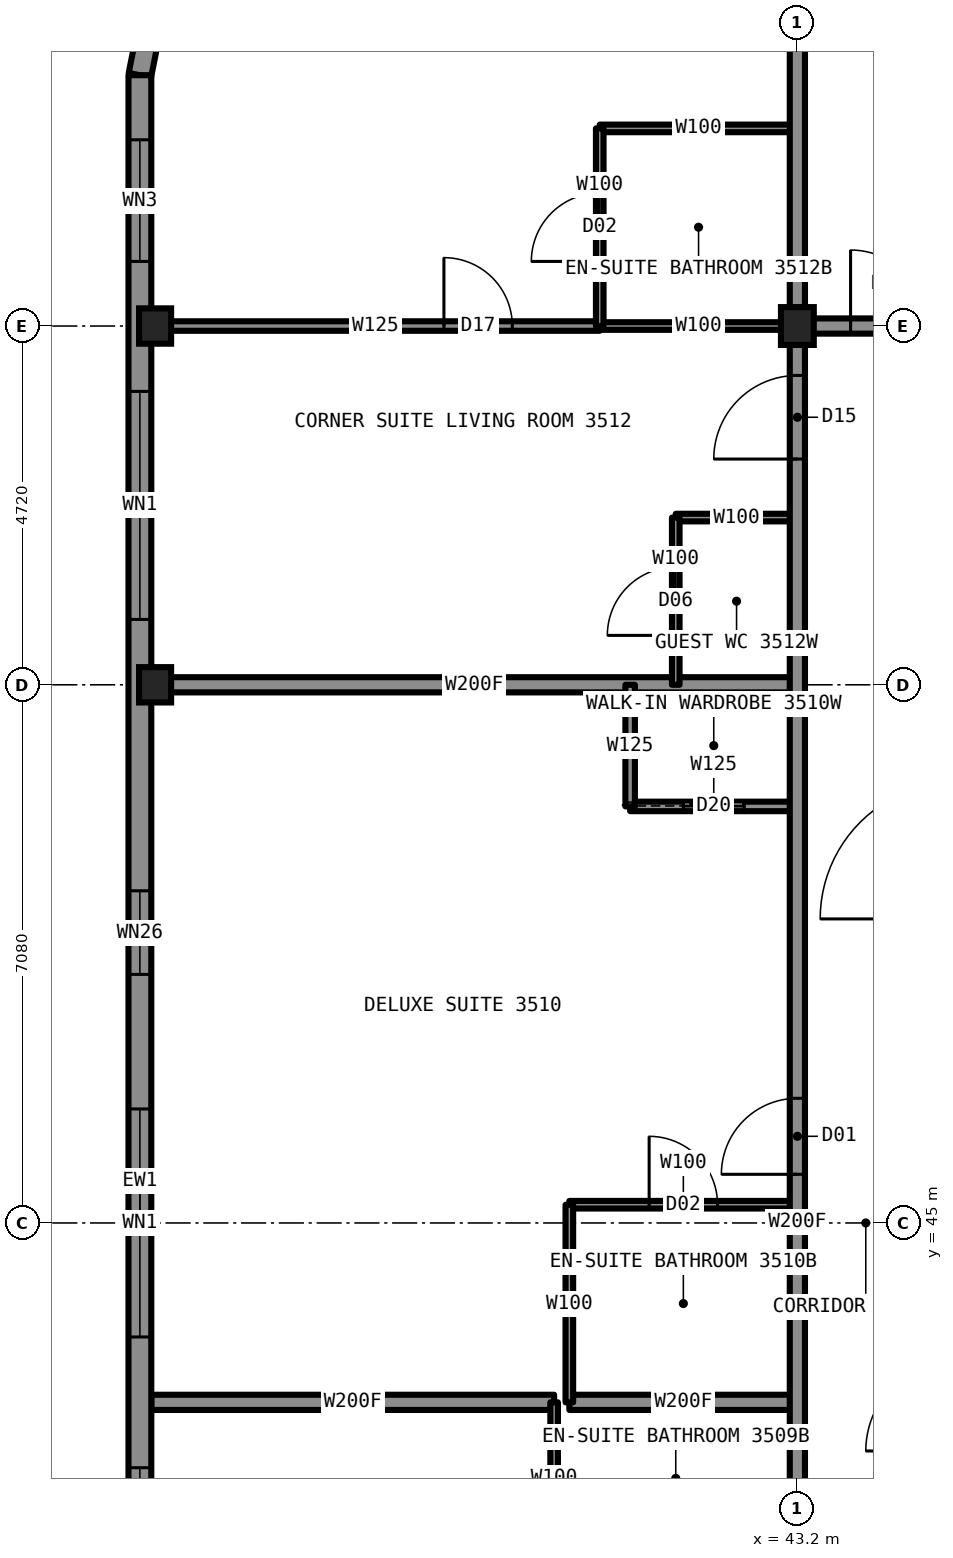
"""IFC4 building model, lengths in metres.
Left out: names, types, materials, properties, quantities, classifications, styles, units other than length and angle.
Written with IfcOpenShell. Run it as: python <this file> out.ifc"""

import sys

from ifc_helpers import new_model, si_unit, direction, frame, frame_2d, origin, origin_2d, place, context, subcontext, project, spatial, rectangle, i_section, extrude, element, fill, save


model = new_model("IFC4")
c1 = context("Model", 3, precision=1e-05, world=origin(), true_north=direction((0.0, 1.0)))
c2 = subcontext(c1, "Body", "Model", "MODEL_VIEW")
j1 = project(units=[si_unit("LENGTHUNIT", "METRE"), si_unit("PLANEANGLEUNIT", "RADIAN")], contexts=[c1])
p1 = place(None, origin())
s1 = spatial("IfcSite", under=j1, at=p1, CompositionType="ELEMENT")
p2 = place(p1, origin())
s2 = spatial("IfcBuilding", under=s1, at=p2, CompositionType="ELEMENT")
p3 = place(p2, frame((0.0, 0.0, 124.9)))
s3 = spatial("IfcBuildingStorey", under=s2, at=p3, CompositionType="ELEMENT", Elevation=124.9)
for number, where, z_axis, x_axis in (
    (1, (34.75, 52.08, 0.0), (0.0, 0.0, 1.0), (1.0, 0.0, 0.0)),
    (2, (34.75, 56.8, 0.0), (0.0, 0.0, 1.0), (1.0, 0.0, 0.0)),
):
    element("IfcColumn", number, at=place(p3, frame(where, z_axis=z_axis, x_axis=x_axis)), inside=s3, PredefinedType="COLUMN", context=c2, shape_type="SweptSolid", body=[
        extrude(i_section(OverallWidth=0.422, OverallDepth=0.465, WebThickness=0.045, FlangeThickness=0.073, at=origin_2d()), origin(), (0.0, 0.0, 1.0), 3.5),
    ])
p4 = place(p3, frame((43.2, 56.8, 0.0), z_axis=(0.0, 0.0, 1.0), x_axis=(1.0, 0.0, 0.0)))
e3 = element("IfcColumn", 3, at=p4, inside=s3, PredefinedType="COLUMN", context=c2, shape_type="SweptSolid", body=[
    extrude(i_section(OverallWidth=0.432, OverallDepth=0.498, WebThickness=0.056, FlangeThickness=0.089, at=origin_2d()), origin(), (0.0, 0.0, 1.0), 3.5),
])
p5 = place(p3, frame((34.7, 42.64, 0.0), z_axis=(0.0, 0.0, 1.0), x_axis=(1.0, 0.0, 0.0)))
e4 = element("IfcWall", 4, at=p5, inside=s3, PredefinedType="PARTITIONING", context=c2, shape_type="SweptSolid", body=[
    extrude(rectangle(XDim=5.3, YDim=0.2, at=frame_2d((2.65, 0.0))), origin(), (0.0, 0.0, 1.0), 2.731),
])
p6 = place(p3, frame((40.2, 42.64, 0.0), z_axis=(0.0, 0.0, 1.0), x_axis=(1.0, 0.0, 0.0)))
e5 = element("IfcWall", 5, at=p6, inside=s3, PredefinedType="PARTITIONING", context=c2, shape_type="SweptSolid", body=[
    extrude(rectangle(XDim=3.0, YDim=0.2, at=frame_2d((1.5, 0.0))), origin(), (0.0, 0.0, 1.0), 2.731),
])
p7 = place(p3, frame((40.2, 45.24, 0.0), z_axis=(0.0, 0.0, 1.0), x_axis=(1.0, 0.0, 0.0)))
e6 = element("IfcWall", 6, at=p7, inside=s3, PredefinedType="PARTITIONING", context=c2, shape_type="SweptSolid", body=[
    extrude(rectangle(XDim=3.0, YDim=0.1, at=frame_2d((1.5, 0.0))), origin(), (0.0, 0.0, 1.0), 3.33),
])
p8 = place(p7, frame((1.05, 0.0, 0.0)))
e7 = element("IfcOpeningElement", 7, at=p8, cuts=e6, PredefinedType="OPENING", context=c2, shape_type="SweptSolid", body=[
    extrude(rectangle(XDim=0.9, YDim=2.1, at=frame_2d((0.45, 1.05))), frame((0.0, 0.06, 0.0), z_axis=(0.0, -1.0, 0.0), x_axis=(1.0, 0.0, 0.0)), (0.0, 0.0, 1.0), 0.12),
])
p9 = place(p3, frame((40.6, 56.8, 0.0), z_axis=(0.0, 0.0, 1.0), x_axis=(1.0, 0.0, 0.0)))
e8 = element("IfcWall", 8, at=p9, inside=s3, PredefinedType="PARTITIONING", context=c2, shape_type="SweptSolid", body=[
    extrude(rectangle(XDim=2.6, YDim=0.1, at=frame_2d((1.3, 0.0))), origin(), (0.0, 0.0, 1.0), 2.573),
])
p10 = place(p3, frame((43.2, 56.8, 0.0), z_axis=(0.0, 0.0, 1.0), x_axis=(1.0, 0.0, 0.0)))
e9 = element("IfcWall", 9, at=p10, inside=s3, PredefinedType="PARTITIONING", context=c2, shape_type="SweptSolid", body=[
    extrude(rectangle(XDim=23.6, YDim=0.2, at=frame_2d((11.8, 0.0))), origin(), (0.0, 0.0, 1.0), 3.33),
])
p11 = place(p10, frame((0.7, 0.0, 0.0)))
e10 = element("IfcOpeningElement", 10, at=p11, cuts=e9, PredefinedType="OPENING", context=c2, shape_type="SweptSolid", body=[
    extrude(rectangle(XDim=1.0, YDim=2.2, at=frame_2d((0.5, 1.1))), frame((0.0, 0.11, 0.0), z_axis=(0.0, -1.0, 0.0), x_axis=(1.0, 0.0, 0.0)), (0.0, 0.0, 1.0), 0.22),
])
p12 = place(p10, frame((5.12, 0.0, 0.0)))
e11 = element("IfcOpeningElement", 11, at=p12, cuts=e9, PredefinedType="OPENING", context=c2, shape_type="SweptSolid", body=[
    extrude(rectangle(XDim=1.0, YDim=2.2, at=frame_2d((0.5, 1.1))), frame((0.0, 0.11, 0.0), z_axis=(0.0, -1.0, 0.0), x_axis=(1.0, 0.0, 0.0)), (0.0, 0.0, 1.0), 0.22),
])
p13 = place(p10, frame((12.44, 0.0, 0.0)))
e12 = element("IfcOpeningElement", 12, at=p13, cuts=e9, PredefinedType="OPENING", context=c2, shape_type="SweptSolid", body=[
    extrude(rectangle(XDim=1.0, YDim=2.2, at=frame_2d((0.5, 1.1))), frame((0.0, 0.11, 0.0), z_axis=(0.0, -1.0, 0.0), x_axis=(1.0, 0.0, 0.0)), (0.0, 0.0, 1.0), 0.22),
])
p14 = place(p10, frame((21.14, 0.0, 0.0)))
e13 = element("IfcOpeningElement", 13, at=p14, cuts=e9, PredefinedType="OPENING", context=c2, shape_type="SweptSolid", body=[
    extrude(rectangle(XDim=1.0, YDim=2.2, at=frame_2d((0.5, 1.1))), frame((0.0, 0.11, 0.0), z_axis=(0.0, -1.0, 0.0), x_axis=(1.0, 0.0, 0.0)), (0.0, 0.0, 1.0), 0.22),
])
p15 = place(p3, frame((34.7, 56.8, 0.0), z_axis=(0.0, 0.0, 1.0), x_axis=(1.0, 0.0, 0.0)))
e14 = element("IfcWall", 14, at=p15, inside=s3, PredefinedType="PARTITIONING", context=c2, shape_type="SweptSolid", body=[
    extrude(rectangle(XDim=5.9, YDim=0.125, at=frame_2d((2.95, 0.0))), origin(), (0.0, 0.0, 1.0), 2.573),
])
p16 = place(p15, frame((3.85, 0.0, 0.0)))
e15 = element("IfcOpeningElement", 15, at=p16, cuts=e14, PredefinedType="OPENING", context=c2, shape_type="SweptSolid", body=[
    extrude(rectangle(XDim=0.9, YDim=2.2, at=frame_2d((0.45, 1.1))), frame((0.0, 0.073, 0.0), z_axis=(0.0, -1.0, 0.0), x_axis=(1.0, 0.0, 0.0)), (0.0, 0.0, 1.0), 0.145),
])
p17 = place(p3, frame((40.6, 59.4, 0.0), z_axis=(0.0, 0.0, 1.0), x_axis=(1.0, 0.0, 0.0)))
e16 = element("IfcWall", 16, at=p17, inside=s3, PredefinedType="PARTITIONING", context=c2, shape_type="SweptSolid", body=[
    extrude(rectangle(XDim=2.6, YDim=0.1, at=frame_2d((1.3, 0.0))), origin(), (0.0, 0.0, 1.0), 3.33),
])
p18 = place(p3, frame((41.0, 50.48, 0.0), z_axis=(0.0, 0.0, 1.0), x_axis=(1.0, 0.0, 0.0)))
e17 = element("IfcWall", 17, at=p18, inside=s3, PredefinedType="PARTITIONING", context=c2, shape_type="SweptSolid", body=[
    extrude(rectangle(XDim=2.2, YDim=0.125, at=frame_2d((1.1, 0.0))), origin(), (0.0, 0.0, 1.0), 3.33),
])
p19 = place(p18, frame((0.7, 0.0, 0.0)))
e18 = element("IfcOpeningElement", 18, at=p19, cuts=e17, PredefinedType="OPENING", context=c2, shape_type="SweptSolid", body=[
    extrude(rectangle(XDim=0.8, YDim=2.1, at=frame_2d((0.4, 1.05))), frame((0.0, 0.073, 0.0), z_axis=(0.0, -1.0, 0.0), x_axis=(1.0, 0.0, 0.0)), (0.0, 0.0, 1.0), 0.145),
])
p20 = place(p3, frame((34.7, 52.08, 0.0), z_axis=(0.0, 0.0, 1.0), x_axis=(1.0, 0.0, 0.0)))
e19 = element("IfcWall", 19, at=p20, inside=s3, PredefinedType="PARTITIONING", context=c2, shape_type="SweptSolid", body=[
    extrude(rectangle(XDim=8.5, YDim=0.2, at=frame_2d((4.25, 0.0))), origin(), (0.0, 0.0, 1.0), 2.573),
])
p21 = place(p3, frame((41.6, 54.28, 0.0), z_axis=(0.0, 0.0, 1.0), x_axis=(1.0, 0.0, 0.0)))
e20 = element("IfcWall", 20, at=p21, inside=s3, PredefinedType="PARTITIONING", context=c2, shape_type="SweptSolid", body=[
    extrude(rectangle(XDim=1.6, YDim=0.1, at=frame_2d((0.8, 0.0))), origin(), (0.0, 0.0, 1.0), 3.33),
])
p22 = place(p3, frame((43.2, 33.22, 0.0), z_axis=(0.0, 0.0, 1.0), x_axis=(0.0, 1.0, 0.0)))
e21 = element("IfcWall", 21, at=p22, inside=s3, PredefinedType="PARTITIONING", context=c2, shape_type="SweptSolid", body=[
    extrude(rectangle(XDim=23.58, YDim=0.2, at=frame_2d((11.79, 0.0))), origin(), (0.0, 0.0, 1.0), 3.33),
])
p23 = place(p22, frame((6.16, 0.0, 0.0)))
e22 = element("IfcOpeningElement", 22, at=p23, cuts=e21, PredefinedType="OPENING", context=c2, shape_type="SweptSolid", body=[
    extrude(rectangle(XDim=1.0, YDim=2.2, at=frame_2d((0.5, 1.1))), frame((0.0, 0.11, 0.0), z_axis=(0.0, -1.0, 0.0), x_axis=(1.0, 0.0, 0.0)), (0.0, 0.0, 1.0), 0.22),
])
p24 = place(p22, frame((12.42, 0.0, 0.0)))
e23 = element("IfcOpeningElement", 23, at=p24, cuts=e21, PredefinedType="OPENING", context=c2, shape_type="SweptSolid", body=[
    extrude(rectangle(XDim=1.0, YDim=2.2, at=frame_2d((0.5, 1.1))), frame((0.0, 0.11, 0.0), z_axis=(0.0, -1.0, 0.0), x_axis=(1.0, 0.0, 0.0)), (0.0, 0.0, 1.0), 0.22),
])
p25 = place(p22, frame((21.83, 0.0, 0.0)))
e24 = element("IfcOpeningElement", 24, at=p25, cuts=e21, PredefinedType="OPENING", context=c2, shape_type="SweptSolid", body=[
    extrude(rectangle(XDim=1.1, YDim=2.2, at=frame_2d((0.55, 1.1))), frame((0.0, 0.11, 0.0), z_axis=(0.0, -1.0, 0.0), x_axis=(1.0, 0.0, 0.0)), (0.0, 0.0, 1.0), 0.22),
])
p26 = place(p22, frame((0.63, 0.0, 0.0)))
e25 = element("IfcOpeningElement", 25, at=p26, cuts=e21, PredefinedType="OPENING", context=c2, shape_type="SweptSolid", body=[
    extrude(rectangle(XDim=1.1, YDim=2.2, at=frame_2d((0.55, 1.1))), frame((0.0, 0.11, 0.0), z_axis=(0.0, -1.0, 0.0), x_axis=(1.0, 0.0, 0.0)), (0.0, 0.0, 1.0), 0.22),
])
p27 = place(p3, frame((43.2, 56.8, 0.0), z_axis=(0.0, 0.0, 1.0), x_axis=(0.0, 1.0, 0.0)))
e26 = element("IfcWall", 26, at=p27, inside=s3, PredefinedType="PARTITIONING", context=c2, shape_type="SweptSolid", body=[
    extrude(rectangle(XDim=8.5, YDim=0.2, at=frame_2d((4.25, 0.0))), origin(), (0.0, 0.0, 1.0), 2.573),
])
p28 = place(p3, frame((41.6, 52.08, 0.0), z_axis=(0.0, 0.0, 1.0), x_axis=(0.0, 1.0, 0.0)))
e27 = element("IfcWall", 27, at=p28, inside=s3, PredefinedType="PARTITIONING", context=c2, shape_type="SweptSolid", body=[
    extrude(rectangle(XDim=2.2, YDim=0.1, at=frame_2d((1.1, 0.0))), origin(), (0.0, 0.0, 1.0), 3.33),
])
p29 = place(p28, frame((0.65, 0.0, 0.0)))
e28 = element("IfcOpeningElement", 28, at=p29, cuts=e27, PredefinedType="OPENING", context=c2, shape_type="SweptSolid", body=[
    extrude(rectangle(XDim=0.9, YDim=2.1, at=frame_2d((0.45, 1.05))), frame((0.0, 0.06, 0.0), z_axis=(0.0, -1.0, 0.0), x_axis=(1.0, 0.0, 0.0)), (0.0, 0.0, 1.0), 0.12),
])
p30 = place(p3, frame((41.0, 50.48, 0.0), z_axis=(0.0, 0.0, 1.0), x_axis=(0.0, 1.0, 0.0)))
e29 = element("IfcWall", 29, at=p30, inside=s3, PredefinedType="PARTITIONING", context=c2, shape_type="SweptSolid", body=[
    extrude(rectangle(XDim=1.6, YDim=0.125, at=frame_2d((0.8, 0.0))), origin(), (0.0, 0.0, 1.0), 3.33),
])
p31 = place(p3, frame((40.6, 56.8, 0.0), z_axis=(0.0, 0.0, 1.0), x_axis=(0.0, 1.0, 0.0)))
e30 = element("IfcWall", 30, at=p31, inside=s3, PredefinedType="PARTITIONING", context=c2, shape_type="SweptSolid", body=[
    extrude(rectangle(XDim=2.6, YDim=0.1, at=frame_2d((1.3, 0.0))), origin(), (0.0, 0.0, 1.0), 3.33),
])
p32 = place(p31, frame((0.85, 0.0, 0.0)))
e31 = element("IfcOpeningElement", 31, at=p32, cuts=e30, PredefinedType="OPENING", context=c2, shape_type="SweptSolid", body=[
    extrude(rectangle(XDim=0.9, YDim=2.1, at=frame_2d((0.45, 1.05))), frame((0.0, 0.06, 0.0), z_axis=(0.0, -1.0, 0.0), x_axis=(1.0, 0.0, 0.0)), (0.0, 0.0, 1.0), 0.12),
])
p33 = place(p3, frame((40.2, 42.64, 0.0), z_axis=(0.0, 0.0, 1.0), x_axis=(0.0, 1.0, 0.0)))
e32 = element("IfcWall", 32, at=p33, inside=s3, PredefinedType="PARTITIONING", context=c2, shape_type="SweptSolid", body=[
    extrude(rectangle(XDim=2.6, YDim=0.1, at=frame_2d((1.3, 0.0))), origin(), (0.0, 0.0, 1.0), 3.33),
])
p34 = place(p3, frame((40.0, 40.64, 0.0), z_axis=(0.0, 0.0, 1.0), x_axis=(0.0, 1.0, 0.0)))
e33 = element("IfcWall", 33, at=p34, inside=s3, PredefinedType="PARTITIONING", context=c2, shape_type="SweptSolid", body=[
    extrude(rectangle(XDim=2.0, YDim=0.1, at=frame_2d((1.0, 0.0))), origin(), (0.0, 0.0, 1.0), 3.33),
])
p35 = place(p3, frame((34.957, 62.147, 0.0), z_axis=(0.0, 0.0, 1.0), x_axis=(-0.195081421501, -0.980787050784, 0.0)))
e34 = element("IfcWall", 34, at=p35, inside=s3, PredefinedType="SOLIDWALL", context=c2, shape_type="SweptSolid", body=[
    extrude(rectangle(XDim=2.087, YDim=0.3, at=frame_2d((1.044, 0.0))), origin(), (0.0, 0.0, 1.0), 3.33),
])
p36 = place(p35, frame((0.444, 0.0, 0.5)))
e35 = element("IfcOpeningElement", 35, at=p36, cuts=e34, PredefinedType="OPENING", context=c2, shape_type="SweptSolid", body=[
    extrude(rectangle(XDim=1.2, YDim=2.0, at=frame_2d((0.6, 1.0))), frame((0.0, 0.16, 0.0), z_axis=(0.0, -1.0, 0.0), x_axis=(1.0, 0.0, 0.0)), (0.0, 0.0, 1.0), 0.32),
])
p37 = place(p3, frame((34.55, 60.1, 0.0), z_axis=(0.0, 0.0, 1.0), x_axis=(0.0, -1.0, 0.0)))
e36 = element("IfcWall", 36, at=p37, inside=s3, PredefinedType="SOLIDWALL", context=c2, shape_type="SweptSolid", body=[
    extrude(rectangle(XDim=30.2, YDim=0.3, at=frame_2d((15.1, 0.0))), origin(), (0.0, 0.0, 1.0), 2.83),
])
p38 = place(p37, frame((0.85, 0.0, 0.5)))
e37 = element("IfcOpeningElement", 37, at=p38, cuts=e36, PredefinedType="OPENING", context=c2, shape_type="SweptSolid", body=[
    extrude(rectangle(XDim=1.6, YDim=2.0, at=frame_2d((0.8, 1.0))), frame((0.0, 0.16, 0.0), z_axis=(0.0, -1.0, 0.0), x_axis=(1.0, 0.0, 0.0)), (0.0, 0.0, 1.0), 0.32),
])
p39 = place(p37, frame((4.16, 0.0, 0.5)))
e38 = element("IfcOpeningElement", 38, at=p39, cuts=e36, PredefinedType="OPENING", context=c2, shape_type="SweptSolid", body=[
    extrude(rectangle(XDim=3.0, YDim=2.0, at=frame_2d((1.5, 1.0))), frame((0.0, 0.16, 0.0), z_axis=(0.0, -1.0, 0.0), x_axis=(1.0, 0.0, 0.0)), (0.0, 0.0, 1.0), 0.32),
])
p40 = place(p37, frame((8.88, 0.0, 0.5)))
e39 = element("IfcOpeningElement", 39, at=p40, cuts=e36, PredefinedType="OPENING", context=c2, shape_type="SweptSolid", body=[
    extrude(rectangle(XDim=3.0, YDim=2.0, at=frame_2d((1.5, 1.0))), frame((0.0, 0.16, 0.0), z_axis=(0.0, -1.0, 0.0), x_axis=(1.0, 0.0, 0.0)), (0.0, 0.0, 1.0), 0.32),
])
p41 = place(p37, frame((18.32, 0.0, 0.5)))
e40 = element("IfcOpeningElement", 40, at=p41, cuts=e36, PredefinedType="OPENING", context=c2, shape_type="SweptSolid", body=[
    extrude(rectangle(XDim=3.0, YDim=2.0, at=frame_2d((1.5, 1.0))), frame((0.0, 0.16, 0.0), z_axis=(0.0, -1.0, 0.0), x_axis=(1.0, 0.0, 0.0)), (0.0, 0.0, 1.0), 0.32),
])
p42 = place(p37, frame((23.04, 0.0, 0.5)))
e41 = element("IfcOpeningElement", 41, at=p42, cuts=e36, PredefinedType="OPENING", context=c2, shape_type="SweptSolid", body=[
    extrude(rectangle(XDim=3.0, YDim=2.0, at=frame_2d((1.5, 1.0))), frame((0.0, 0.16, 0.0), z_axis=(0.0, -1.0, 0.0), x_axis=(1.0, 0.0, 0.0)), (0.0, 0.0, 1.0), 0.32),
])
p43 = place(p37, frame((27.75, 0.0, 0.5)))
e42 = element("IfcOpeningElement", 42, at=p43, cuts=e36, PredefinedType="OPENING", context=c2, shape_type="SweptSolid", body=[
    extrude(rectangle(XDim=1.6, YDim=2.0, at=frame_2d((0.8, 1.0))), frame((0.0, 0.16, 0.0), z_axis=(0.0, -1.0, 0.0), x_axis=(1.0, 0.0, 0.0)), (0.0, 0.0, 1.0), 0.32),
])
p44 = place(p11, origin())
e43 = element("IfcDoor", 43, at=p44, inside=s3, OperationType="SINGLE_SWING_LEFT", PredefinedType="DOOR", context=c2, shape_type="SweptSolid", body=[
    extrude(rectangle(XDim=1.0, YDim=2.2, at=frame_2d((0.5, 1.1))), frame((0.0, 0.025, 0.0), z_axis=(0.0, -1.0, 0.0), x_axis=(1.0, 0.0, 0.0)), (0.0, 0.0, 1.0), 0.05),
])
fill(e10, e43)
p45 = place(p24, origin())
e44 = element("IfcDoor", 44, at=p45, inside=s3, OperationType="SINGLE_SWING_LEFT", PredefinedType="DOOR", context=c2, shape_type="SweptSolid", body=[
    extrude(rectangle(XDim=1.0, YDim=2.2, at=frame_2d((0.5, 1.1))), frame((0.0, 0.025, 0.0), z_axis=(0.0, -1.0, 0.0), x_axis=(1.0, 0.0, 0.0)), (0.0, 0.0, 1.0), 0.05),
])
fill(e23, e44)
p46 = place(p8, origin())
e45 = element("IfcDoor", 45, at=p46, inside=s3, OperationType="SINGLE_SWING_RIGHT", PredefinedType="DOOR", context=c2, shape_type="SweptSolid", body=[
    extrude(rectangle(XDim=0.9, YDim=2.1, at=frame_2d((0.45, 1.05))), frame((0.0, 0.025, 0.0), z_axis=(0.0, -1.0, 0.0), x_axis=(1.0, 0.0, 0.0)), (0.0, 0.0, 1.0), 0.05),
])
fill(e7, e45)
p47 = place(p19, origin())
e46 = element("IfcDoor", 46, at=p47, inside=s3, OperationType="SLIDING_TO_LEFT", PredefinedType="DOOR", context=c2, shape_type="SweptSolid", body=[
    extrude(rectangle(XDim=0.8, YDim=2.1, at=frame_2d((0.4, 1.05))), frame((0.0, 0.025, 0.0), z_axis=(0.0, -1.0, 0.0), x_axis=(1.0, 0.0, 0.0)), (0.0, 0.0, 1.0), 0.05),
])
fill(e18, e46)
p48 = place(p25, origin())
e47 = element("IfcDoor", 47, at=p48, inside=s3, OperationType="SINGLE_SWING_LEFT", PredefinedType="DOOR", context=c2, shape_type="SweptSolid", body=[
    extrude(rectangle(XDim=1.1, YDim=2.2, at=frame_2d((0.55, 1.1))), frame((0.0, 0.025, 0.0), z_axis=(0.0, -1.0, 0.0), x_axis=(1.0, 0.0, 0.0)), (0.0, 0.0, 1.0), 0.05),
])
fill(e24, e47)
p49 = place(p32, origin())
e48 = element("IfcDoor", 48, at=p49, inside=s3, OperationType="SINGLE_SWING_RIGHT", PredefinedType="DOOR", context=c2, shape_type="SweptSolid", body=[
    extrude(rectangle(XDim=0.9, YDim=2.1, at=frame_2d((0.45, 1.05))), frame((0.0, 0.025, 0.0), z_axis=(0.0, -1.0, 0.0), x_axis=(1.0, 0.0, 0.0)), (0.0, 0.0, 1.0), 0.05),
])
fill(e31, e48)
p50 = place(p16, origin())
e49 = element("IfcDoor", 49, at=p50, inside=s3, OperationType="SINGLE_SWING_LEFT", PredefinedType="DOOR", context=c2, shape_type="SweptSolid", body=[
    extrude(rectangle(XDim=0.9, YDim=2.2, at=frame_2d((0.45, 1.1))), frame((0.0, 0.025, 0.0), z_axis=(0.0, -1.0, 0.0), x_axis=(1.0, 0.0, 0.0)), (0.0, 0.0, 1.0), 0.05),
])
fill(e15, e49)
p51 = place(p29, origin())
e50 = element("IfcDoor", 50, at=p51, inside=s3, OperationType="SINGLE_SWING_LEFT", PredefinedType="DOOR", context=c2, shape_type="SweptSolid", body=[
    extrude(rectangle(XDim=0.9, YDim=2.1, at=frame_2d((0.45, 1.05))), frame((0.0, 0.025, 0.0), z_axis=(0.0, -1.0, 0.0), x_axis=(1.0, 0.0, 0.0)), (0.0, 0.0, 1.0), 0.05),
])
fill(e28, e50)
p52 = place(p38, origin())
e51 = element("IfcWindow", 51, at=p52, inside=s3, PartitioningType="SINGLE_PANEL", PredefinedType="WINDOW", context=c2, shape_type="SweptSolid", body=[
    extrude(rectangle(XDim=1.6, YDim=2.0, at=frame_2d((0.8, 1.0))), frame((0.0, 0.03, 0.0), z_axis=(0.0, -1.0, 0.0), x_axis=(1.0, 0.0, 0.0)), (0.0, 0.0, 1.0), 0.06),
])
fill(e37, e51)
p53 = place(p39, origin())
e52 = element("IfcWindow", 52, at=p53, inside=s3, PartitioningType="SINGLE_PANEL", PredefinedType="WINDOW", context=c2, shape_type="SweptSolid", body=[
    extrude(rectangle(XDim=3.0, YDim=2.0, at=frame_2d((1.5, 1.0))), frame((0.0, 0.03, 0.0), z_axis=(0.0, -1.0, 0.0), x_axis=(1.0, 0.0, 0.0)), (0.0, 0.0, 1.0), 0.06),
])
fill(e38, e52)
p54 = place(p40, origin())
e53 = element("IfcWindow", 53, at=p54, inside=s3, PartitioningType="SINGLE_PANEL", PredefinedType="WINDOW", context=c2, shape_type="SweptSolid", body=[
    extrude(rectangle(XDim=3.0, YDim=2.0, at=frame_2d((1.5, 1.0))), frame((0.0, 0.03, 0.0), z_axis=(0.0, -1.0, 0.0), x_axis=(1.0, 0.0, 0.0)), (0.0, 0.0, 1.0), 0.06),
])
fill(e39, e53)
p55 = place(p41, origin())
e54 = element("IfcWindow", 54, at=p55, inside=s3, PartitioningType="SINGLE_PANEL", PredefinedType="WINDOW", context=c2, shape_type="SweptSolid", body=[
    extrude(rectangle(XDim=3.0, YDim=2.0, at=frame_2d((1.5, 1.0))), frame((0.0, 0.03, 0.0), z_axis=(0.0, -1.0, 0.0), x_axis=(1.0, 0.0, 0.0)), (0.0, 0.0, 1.0), 0.06),
])
fill(e40, e54)
save(model, sys.argv[1])
